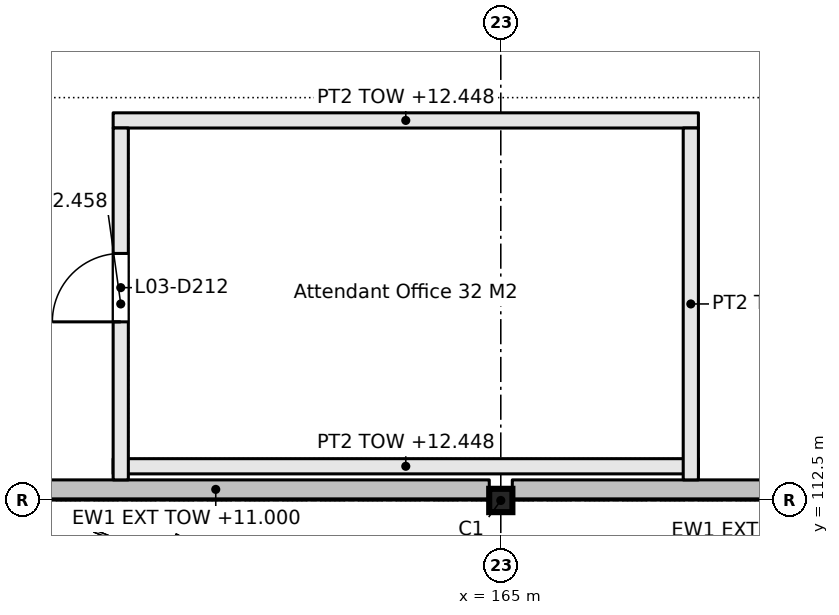
"""IFC4 building model, lengths in metres.
Left out: names, types, materials, properties, quantities, classifications, styles, units other than length and angle.
Written with IfcOpenShell. Run it as: python <this file> out.ifc"""

import sys

from ifc_helpers import new_model, si_unit, direction, frame, frame_2d, origin, origin_2d, place, context, subcontext, project, spatial, rectangle, i_section, extrude, element, fill, save


model = new_model("IFC4")
c1 = context("Model", 3, precision=1e-05, world=origin(), true_north=direction((0.0, 1.0)))
c2 = subcontext(c1, "Body", "Model", "MODEL_VIEW")
j1 = project(units=[si_unit("LENGTHUNIT", "METRE"), si_unit("PLANEANGLEUNIT", "RADIAN")], contexts=[c1])
p1 = place(None, origin())
s1 = spatial("IfcSite", under=j1, at=p1, CompositionType="ELEMENT")
p2 = place(p1, origin())
s2 = spatial("IfcBuilding", under=s1, at=p2, CompositionType="ELEMENT")
p3 = place(p2, frame((0.0, 0.0, 9.9)))
s3 = spatial("IfcBuildingStorey", under=s2, at=p3, CompositionType="ELEMENT", Elevation=9.9)
p4 = place(p3, frame((165.0, 112.5, 0.0), z_axis=(0.0, 0.0, 1.0), x_axis=(1.0, 0.0, 0.0)))
e1 = element("IfcColumn", 1, at=p4, inside=s3, PredefinedType="COLUMN", context=c2, shape_type="SweptSolid", body=[
    extrude(i_section(OverallWidth=0.305, OverallDepth=0.307, WebThickness=0.01, FlangeThickness=0.015, FilletRadius=0.015, at=origin_2d()), origin(), (0.0, 0.0, 1.0), 3.3),
])
for number, where, z_axis, x_axis in (
    (2, (159.9, 112.95, 0.0), (0.0, 0.0, 1.0), (1.0, 0.0, 0.0)),
    (3, (159.9, 117.5, 0.0), (0.0, 0.0, 1.0), (1.0, 0.0, 0.0)),
):
    element("IfcWall", number, at=place(p3, frame(where, z_axis=z_axis, x_axis=x_axis)), inside=s3, PredefinedType="PARTITIONING", context=c2, shape_type="SweptSolid", body=[
        extrude(rectangle(XDim=7.7, YDim=0.2, at=frame_2d((3.85, 0.0))), origin(), (0.0, 0.0, 1.0), 2.548),
    ])
p5 = place(p3, frame((160.0, 112.771, 0.0), z_axis=(0.0, 0.0, 1.0), x_axis=(0.0, 1.0, 0.0)))
e4 = element("IfcWall", 4, at=p5, inside=s3, PredefinedType="PARTITIONING", context=c2, shape_type="SweptSolid", body=[
    extrude(rectangle(XDim=4.629, YDim=0.2, at=frame_2d((2.314, 0.0))), origin(), (0.0, 0.0, 1.0), 2.558),
])
p6 = place(p5, frame((2.079, 0.0, 0.0)))
e5 = element("IfcOpeningElement", 5, at=p6, cuts=e4, PredefinedType="OPENING", context=c2, shape_type="SweptSolid", body=[
    extrude(rectangle(XDim=0.9, YDim=2.1, at=frame_2d((0.45, 1.05))), frame((0.0, 0.11, 0.0), z_axis=(0.0, -1.0, 0.0), x_axis=(1.0, 0.0, 0.0)), (0.0, 0.0, 1.0), 0.22),
])
p7 = place(p3, frame((167.5, 112.771, 0.0), z_axis=(0.0, 0.0, 1.0), x_axis=(0.0, 1.0, 0.0)))
e6 = element("IfcWall", 6, at=p7, inside=s3, PredefinedType="PARTITIONING", context=c2, shape_type="SweptSolid", body=[
    extrude(rectangle(XDim=4.629, YDim=0.2, at=frame_2d((2.314, 0.0))), origin(), (0.0, 0.0, 1.0), 2.558),
])
for number, where, z_axis, x_axis in (
    (7, (157.652, 112.646, 0.0), (0.0, 0.0, 1.0), (1.0, 0.0, 0.0)),
    (8, (165.152, 112.646, 0.0), (0.0, 0.0, 1.0), (1.0, 0.0, 0.0)),
):
    element("IfcWall", number, at=place(p3, frame(where, z_axis=z_axis, x_axis=x_axis)), inside=s3, PredefinedType="SOLIDWALL", context=c2, shape_type="SweptSolid", body=[
        extrude(rectangle(XDim=7.197, YDim=0.25, at=frame_2d((3.598, 0.0))), origin(), (0.0, 0.0, 1.0), 1.1),
    ])
p8 = place(p6, origin())
e9 = element("IfcDoor", 9, at=p8, inside=s3, OperationType="SINGLE_SWING_RIGHT", PredefinedType="DOOR", context=c2, shape_type="SweptSolid", body=[
    extrude(rectangle(XDim=0.9, YDim=2.1, at=frame_2d((0.45, 1.05))), frame((0.0, 0.025, 0.0), z_axis=(0.0, -1.0, 0.0), x_axis=(1.0, 0.0, 0.0)), (0.0, 0.0, 1.0), 0.05),
])
fill(e5, e9)
save(model, sys.argv[1])
